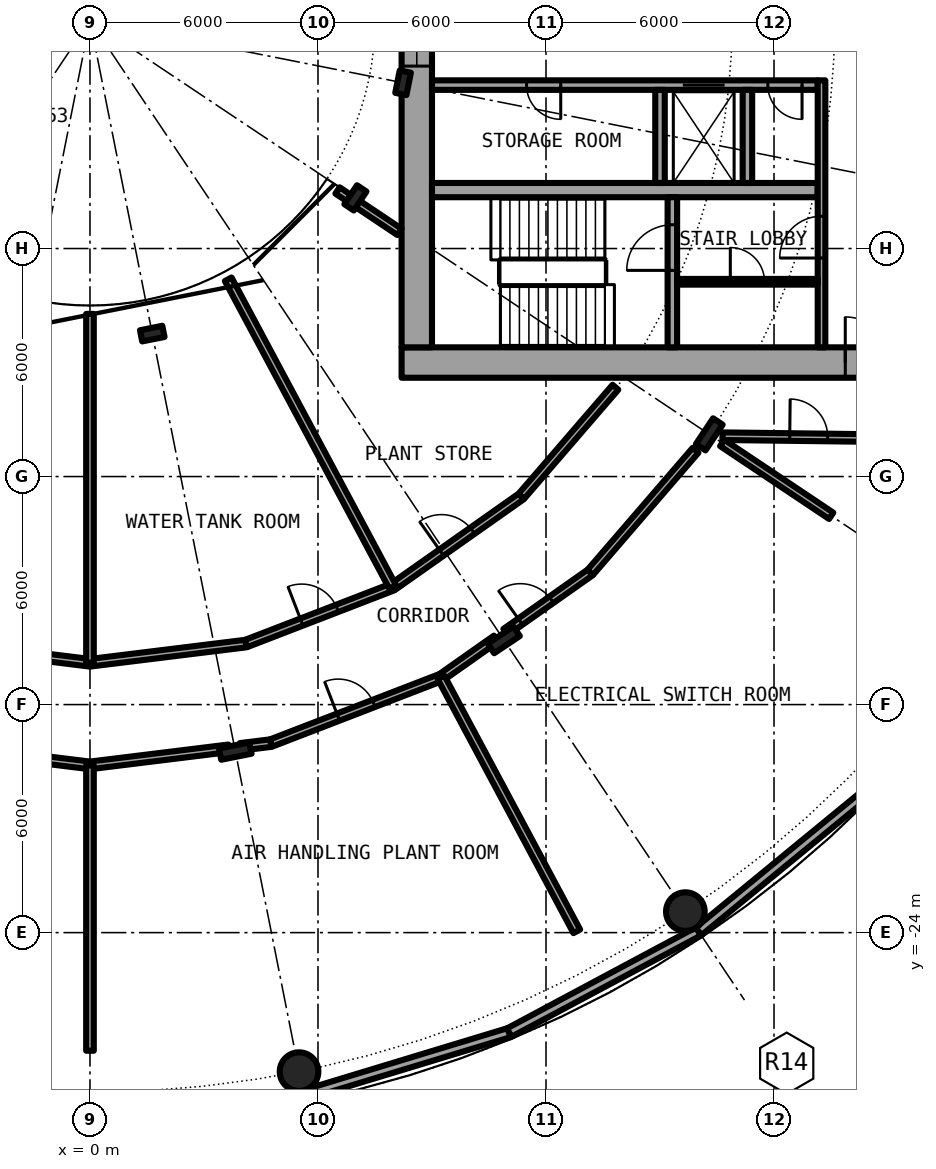
"""IFC4 building model, lengths in metres.
Left out: names, types, materials, properties, quantities, classifications, styles, units other than length and angle.
Written with IfcOpenShell. Run it as: python <this file> out.ifc"""

import sys

from ifc_helpers import new_model, si_unit, direction, frame, frame_2d, origin, origin_2d, place, context, subcontext, project, spatial, rectangle, hollow_circle, i_section, extrude, element, fill, save


model = new_model("IFC4")
c1 = context("Model", 3, precision=1e-05, world=origin(), true_north=direction((0.0, 1.0)))
c2 = subcontext(c1, "Body", "Model", "MODEL_VIEW")
j1 = project(units=[si_unit("LENGTHUNIT", "METRE"), si_unit("PLANEANGLEUNIT", "RADIAN")], contexts=[c1])
p1 = place(None, origin())
s1 = spatial("IfcSite", under=j1, at=p1, CompositionType="ELEMENT")
p2 = place(p1, origin())
s2 = spatial("IfcBuilding", under=s1, at=p2, CompositionType="ELEMENT")
p3 = place(p2, frame((0.0, 0.0, 18.3)))
s3 = spatial("IfcBuildingStorey", under=s2, at=p3, CompositionType="ELEMENT", Elevation=18.3)
for number, where, z_axis, x_axis in (
    (1, (5.501, -27.658, 0.0), (0.0, 0.0, 1.0), (1.0, 0.0, 0.0)),
    (2, (15.667, -23.448, 0.0), (0.0, 0.0, 1.0), (1.0, 0.0, 0.0)),
):
    element("IfcColumn", number, at=place(p3, frame(where, z_axis=z_axis, x_axis=x_axis)), inside=s3, PredefinedType="COLUMN", context=c2, shape_type="SweptSolid", body=[
        extrude(hollow_circle(Radius=0.508, WallThickness=0.05, at=origin_2d()), origin(), (0.0, 0.0, 1.0), 4.5),
    ])
for number, where, z_axis, x_axis in (
    (3, (3.824, -19.223, 0.0), (0.0, 0.0, 1.0), (0.195, -0.981, 0.0)),
    (4, (10.889, -16.297, 0.0), (0.0, 0.0, 1.0), (0.556, -0.831, 0.0)),
    (5, (16.297, -10.889, 0.0), (0.0, 0.0, 1.0), (0.831, -0.556, 0.0)),
):
    element("IfcColumn", number, at=place(p3, frame(where, z_axis=z_axis, x_axis=x_axis)), inside=s3, PredefinedType="COLUMN", context=c2, shape_type="SweptSolid", body=[
        extrude(i_section(OverallWidth=0.303, OverallDepth=0.814, WebThickness=0.021, FlangeThickness=0.04, FilletRadius=0.03, at=origin_2d()), origin(), (0.0, 0.0, 1.0), 4.5),
    ])
for number, where, z_axis, x_axis in (
    (6, (1.639, -8.239, 0.0), (0.0, 0.0, 1.0), (0.195, -0.981, 0.0)),
    (7, (6.984, -4.667, 0.0), (0.0, 0.0, 1.0), (0.831, -0.556, 0.0)),
    (8, (8.239, -1.639, 0.0), (0.0, 0.0, 1.0), (0.981, -0.195, 0.0)),
):
    element("IfcColumn", number, at=place(p3, frame(where, z_axis=z_axis, x_axis=x_axis)), inside=s3, PredefinedType="COLUMN", context=c2, shape_type="SweptSolid", body=[
        extrude(i_section(OverallWidth=0.3, OverallDepth=0.6, WebThickness=0.015, FlangeThickness=0.03, FilletRadius=0.027, at=origin_2d()), origin(), (0.0, 0.0, 1.0), 4.5),
    ])
p4 = place(p3, frame((5.623, -28.271, 0.0), z_axis=(0.0, 0.0, 1.0), x_axis=(0.956969521741, 0.29018844646, 0.0)))
e9 = element("IfcWall", 9, at=p4, inside=s3, PredefinedType="SOLIDWALL", context=c2, shape_type="SweptSolid", body=[
    extrude(rectangle(XDim=5.651, YDim=0.25, at=frame_2d((2.826, 0.0))), origin(), (0.0, 0.0, 1.0), 4.15),
])
p5 = place(p3, frame((11.031, -26.631, 0.0), z_axis=(0.0, 0.0, 1.0), x_axis=(0.881874058161, 0.471485042756, 0.0)))
e10 = element("IfcWall", 10, at=p5, inside=s3, PredefinedType="SOLIDWALL", context=c2, shape_type="SweptSolid", body=[
    extrude(rectangle(XDim=5.65, YDim=0.25, at=frame_2d((2.825, 0.0))), origin(), (0.0, 0.0, 1.0), 4.15),
])
p6 = place(p3, frame((16.014, -23.967, 0.0), z_axis=(0.0, 0.0, 1.0), x_axis=(0.773001659186, 0.634403999748, 0.0)))
e11 = element("IfcWall", 11, at=p6, inside=s3, PredefinedType="SOLIDWALL", context=c2, shape_type="SweptSolid", body=[
    extrude(rectangle(XDim=5.651, YDim=0.25, at=frame_2d((2.825, 0.0))), origin(), (0.0, 0.0, 1.0), 4.15),
])
p7 = place(p3, frame((8.2, -9.0, 0.0), z_axis=(0.0, 0.0, 1.0), x_axis=(1.0, 0.0, 0.0)))
e12 = element("IfcWall", 12, at=p7, inside=s3, PredefinedType="SHEAR", context=c2, shape_type="SweptSolid", body=[
    extrude(rectangle(XDim=14.2, YDim=0.8, at=frame_2d((7.1, 0.0))), origin(), (0.0, 0.0, 1.0), 4.5),
])
p8 = place(p7, frame((11.675, 0.0, 0.0)))
e13 = element("IfcOpeningElement", 13, at=p8, cuts=e12, PredefinedType="OPENING", context=c2, shape_type="SweptSolid", body=[
    extrude(rectangle(XDim=1.2, YDim=2.3, at=frame_2d((0.6, 1.15))), frame((0.0, 0.41, 0.0), z_axis=(0.0, -1.0, 0.0), x_axis=(1.0, 0.0, 0.0)), (0.0, 0.0, 1.0), 0.82),
])
p9 = place(p3, frame((8.6, -8.6, 0.0), z_axis=(0.0, 0.0, 1.0), x_axis=(0.0, 1.0, 0.0)))
e14 = element("IfcWall", 14, at=p9, inside=s3, PredefinedType="SHEAR", context=c2, shape_type="SweptSolid", body=[
    extrude(rectangle(XDim=17.2, YDim=0.8, at=frame_2d((8.6, 0.0))), origin(), (0.0, 0.0, 1.0), 4.5),
])
p10 = place(p9, frame((7.4, 0.0, 0.1)))
e15 = element("IfcOpeningElement", 15, at=p10, cuts=e14, PredefinedType="OPENING", context=c2, shape_type="SweptSolid", body=[
    extrude(rectangle(XDim=2.4, YDim=2.2, at=frame_2d((1.2, 1.1))), frame((0.0, 0.41, 0.0), z_axis=(0.0, -1.0, 0.0), x_axis=(1.0, 0.0, 0.0)), (0.0, 0.0, 1.0), 0.82),
])
p11 = place(p3, frame((19.15, -1.7, 0.0), z_axis=(0.0, 0.0, 1.0), x_axis=(-1.0, 0.0, 0.0)))
e16 = element("IfcWall", 16, at=p11, inside=s3, PredefinedType="SHEAR", context=c2, shape_type="SweptSolid", body=[
    extrude(rectangle(XDim=10.15, YDim=0.25, at=frame_2d((5.075, 0.0))), origin(), (0.0, 0.0, 1.0), 4.5),
])
p12 = place(p11, frame((2.45, 0.0, 0.0)))
e17 = element("IfcOpeningElement", 17, at=p12, cuts=e16, PredefinedType="OPENING", context=c2, shape_type="SweptSolid", body=[
    extrude(rectangle(XDim=1.1, YDim=2.3, at=frame_2d((0.55, 1.15))), frame((0.0, 0.135, 0.0), z_axis=(0.0, -1.0, 0.0), x_axis=(1.0, 0.0, 0.0)), (0.0, 0.0, 1.0), 0.27),
])
p13 = place(p11, frame((6.762, 0.0, 0.0)))
e18 = element("IfcOpeningElement", 18, at=p13, cuts=e16, PredefinedType="OPENING", context=c2, shape_type="SweptSolid", body=[
    extrude(rectangle(XDim=0.9, YDim=2.3, at=frame_2d((0.45, 1.15))), frame((0.0, 0.135, 0.0), z_axis=(0.0, -1.0, 0.0), x_axis=(1.0, 0.0, 0.0)), (0.0, 0.0, 1.0), 0.27),
])
p14 = place(p11, frame((0.413, 0.0, 0.0)))
e19 = element("IfcOpeningElement", 19, at=p14, cuts=e16, PredefinedType="OPENING", context=c2, shape_type="SweptSolid", body=[
    extrude(rectangle(XDim=0.9, YDim=2.3, at=frame_2d((0.45, 1.15))), frame((0.0, 0.135, 0.0), z_axis=(0.0, -1.0, 0.0), x_axis=(1.0, 0.0, 0.0)), (0.0, 0.0, 1.0), 0.27),
])
p15 = place(p3, frame((9.0, -4.462, 0.0), z_axis=(0.0, 0.0, 1.0), x_axis=(1.0, 0.0, 0.0)))
e20 = element("IfcWall", 20, at=p15, inside=s3, PredefinedType="SHEAR", context=c2, shape_type="SweptSolid", body=[
    extrude(rectangle(XDim=10.15, YDim=0.375, at=frame_2d((5.075, 0.0))), origin(), (0.0, 0.0, 1.0), 4.5),
])
p16 = place(p3, frame((15.325, -8.6, 0.0), z_axis=(0.0, 0.0, 1.0), x_axis=(0.0, 1.0, 0.0)))
e21 = element("IfcWall", 21, at=p16, inside=s3, PredefinedType="SHEAR", context=c2, shape_type="SweptSolid", body=[
    extrude(rectangle(XDim=3.95, YDim=0.25, at=frame_2d((1.975, 0.0))), origin(), (0.0, 0.0, 1.0), 4.5),
])
p17 = place(p16, frame((2.025, 0.0, 0.0)))
e22 = element("IfcOpeningElement", 22, at=p17, cuts=e21, PredefinedType="OPENING", context=c2, shape_type="SweptSolid", body=[
    extrude(rectangle(XDim=1.2, YDim=2.3, at=frame_2d((0.6, 1.15))), frame((0.0, 0.135, 0.0), z_axis=(0.0, -1.0, 0.0), x_axis=(1.0, 0.0, 0.0)), (0.0, 0.0, 1.0), 0.27),
])
for number, where, z_axis, x_axis in (
    (23, (15.0, -1.825, 0.0), (0.0, 0.0, 1.0), (0.0, -1.0, 0.0)),
    (24, (17.3, -1.825, 0.0), (0.0, 0.0, 1.0), (0.0, -1.0, 0.0)),
):
    element("IfcWall", number, at=place(p3, frame(where, z_axis=z_axis, x_axis=x_axis)), inside=s3, PredefinedType="SOLIDWALL", context=c2, shape_type="SweptSolid", body=[
        extrude(rectangle(XDim=2.45, YDim=0.25, at=frame_2d((1.225, 0.0))), origin(), (0.0, 0.0, 1.0), 4.15),
    ])
p18 = place(p3, frame((19.25, -8.6, 0.0), z_axis=(0.0, 0.0, 1.0), x_axis=(0.0, 1.0, 0.0)))
e25 = element("IfcWall", 25, at=p18, inside=s3, PredefinedType="SOLIDWALL", context=c2, shape_type="SweptSolid", body=[
    extrude(rectangle(XDim=7.025, YDim=0.2, at=frame_2d((3.513, 0.0))), origin(), (0.0, 0.0, 1.0), 4.15),
])
p19 = place(p18, frame((2.35, 0.0, 0.0)))
e26 = element("IfcOpeningElement", 26, at=p19, cuts=e25, PredefinedType="OPENING", context=c2, shape_type="SweptSolid", body=[
    extrude(rectangle(XDim=1.1, YDim=2.3, at=frame_2d((0.55, 1.15))), frame((0.0, 0.11, 0.0), z_axis=(0.0, -1.0, 0.0), x_axis=(1.0, 0.0, 0.0)), (0.0, 0.0, 1.0), 0.22),
])
p20 = place(p3, frame((15.45, -6.875, 0.0), z_axis=(0.0, 0.0, 1.0), x_axis=(1.0, 0.0, 0.0)))
e27 = element("IfcWall", 27, at=p20, inside=s3, PredefinedType="PARTITIONING", context=c2, shape_type="SweptSolid", body=[
    extrude(rectangle(XDim=3.7, YDim=0.15, at=frame_2d((1.85, 0.0))), origin(), (0.0, 0.0, 1.0), 4.15),
])
p21 = place(p20, frame((1.4, 0.0, 0.0)))
e28 = element("IfcOpeningElement", 28, at=p21, cuts=e27, PredefinedType="OPENING", context=c2, shape_type="SweptSolid", body=[
    extrude(rectangle(XDim=0.9, YDim=2.3, at=frame_2d((0.45, 1.15))), frame((0.0, 0.085, 0.0), z_axis=(0.0, -1.0, 0.0), x_axis=(1.0, 0.0, 0.0)), (0.0, 0.0, 1.0), 0.17),
])
for number, where, z_axis, x_axis in (
    (29, (-3.655, -19.15, 0.0), (0.0, 0.0, 1.0), (0.992, -0.122, 0.0)),
    (30, (0.0, -19.6, 0.0), (0.0, 0.0, 1.0), (0.992, 0.122, 0.0)),
):
    element("IfcWall", number, at=place(p3, frame(where, z_axis=z_axis, x_axis=x_axis)), inside=s3, PredefinedType="PARTITIONING", context=c2, shape_type="SweptSolid", body=[
        extrude(rectangle(XDim=3.683, YDim=0.2, at=frame_2d((1.841, 0.0))), origin(), (0.0, 0.0, 1.0), 3.73),
    ])
p22 = place(p3, frame((3.956, -19.112, 0.0), z_axis=(0.0, 0.0, 1.0), x_axis=(0.992521102393, 0.122073180119, 0.0)))
e31 = element("IfcWall", 31, at=p22, inside=s3, PredefinedType="PARTITIONING", context=c2, shape_type="SweptSolid", body=[
    extrude(rectangle(XDim=0.812, YDim=0.2, at=frame_2d((0.406, 0.0))), origin(), (0.0, 0.0, 1.0), 3.73),
])
p23 = place(p3, frame((4.762, -19.013, 0.0), z_axis=(0.0, 0.0, 1.0), x_axis=(0.932988479706, 0.359906233255, 0.0)))
e32 = element("IfcWall", 32, at=p23, inside=s3, PredefinedType="PARTITIONING", context=c2, shape_type="SweptSolid", body=[
    extrude(rectangle(XDim=4.799, YDim=0.2, at=frame_2d((2.399, 0.0))), origin(), (0.0, 0.0, 1.0), 3.73),
])
p24 = place(p23, frame((1.899, 0.0, 0.0)))
e33 = element("IfcOpeningElement", 33, at=p24, cuts=e32, PredefinedType="OPENING", context=c2, shape_type="SweptSolid", body=[
    extrude(rectangle(XDim=1.0, YDim=2.3, at=frame_2d((0.5, 1.15))), frame((0.0, 0.11, 0.0), z_axis=(0.0, -1.0, 0.0), x_axis=(1.0, 0.0, 0.0)), (0.0, 0.0, 1.0), 0.22),
])
p25 = place(p3, frame((9.239, -17.286, 0.0), z_axis=(0.0, 0.0, 1.0), x_axis=(0.817849682833, 0.575431921508, 0.0)))
e34 = element("IfcWall", 34, at=p25, inside=s3, PredefinedType="PARTITIONING", context=c2, shape_type="SweptSolid", body=[
    extrude(rectangle(XDim=1.771, YDim=0.2, at=frame_2d((0.885, 0.0))), origin(), (0.0, 0.0, 1.0), 3.73),
])
p26 = place(p3, frame((10.935, -16.092, 0.0), z_axis=(0.0, 0.0, 1.0), x_axis=(0.817595540973, 0.575792958781, 0.0)))
e35 = element("IfcWall", 35, at=p26, inside=s3, PredefinedType="PARTITIONING", context=c2, shape_type="SweptSolid", body=[
    extrude(rectangle(XDim=2.725, YDim=0.2, at=frame_2d((1.363, 0.0))), origin(), (0.0, 0.0, 1.0), 3.73),
])
p27 = place(p26, frame((0.476, 0.0, 0.0)))
e36 = element("IfcOpeningElement", 36, at=p27, cuts=e35, PredefinedType="OPENING", context=c2, shape_type="SweptSolid", body=[
    extrude(rectangle(XDim=1.0, YDim=2.3, at=frame_2d((0.5, 1.15))), frame((0.0, 0.11, 0.0), z_axis=(0.0, -1.0, 0.0), x_axis=(1.0, 0.0, 0.0)), (0.0, 0.0, 1.0), 0.22),
])
p28 = place(p3, frame((13.163, -14.523, 0.0), z_axis=(0.0, 0.0, 1.0), x_axis=(0.653128497371, 0.757247097005, 0.0)))
e37 = element("IfcWall", 37, at=p28, inside=s3, PredefinedType="PARTITIONING", context=c2, shape_type="SweptSolid", body=[
    extrude(rectangle(XDim=4.244, YDim=0.2, at=frame_2d((2.122, 0.0))), origin(), (0.0, 0.0, 1.0), 3.73),
])
for number, where, z_axis, x_axis in (
    (38, (-4.106, -16.394, 0.0), (0.0, 0.0, 1.0), (0.992, -0.122, 0.0)),
    (39, (0.0, -16.9, 0.0), (0.0, 0.0, 1.0), (0.992, 0.122, 0.0)),
):
    element("IfcWall", number, at=place(p3, frame(where, z_axis=z_axis, x_axis=x_axis)), inside=s3, PredefinedType="PARTITIONING", context=c2, shape_type="SweptSolid", body=[
        extrude(rectangle(XDim=4.137, YDim=0.2, at=frame_2d((2.068, 0.0))), origin(), (0.0, 0.0, 1.0), 4.15),
    ])
p29 = place(p3, frame((4.106, -16.394, 0.0), z_axis=(0.0, 0.0, 1.0), x_axis=(0.932943640288, 0.360022449363, 0.0)))
e40 = element("IfcWall", 40, at=p29, inside=s3, PredefinedType="PARTITIONING", context=c2, shape_type="SweptSolid", body=[
    extrude(rectangle(XDim=4.139, YDim=0.2, at=frame_2d((2.069, 0.0))), origin(), (0.0, 0.0, 1.0), 4.15),
])
p30 = place(p29, frame((1.569, 0.0, 0.0)))
e41 = element("IfcOpeningElement", 41, at=p30, cuts=e40, PredefinedType="OPENING", context=c2, shape_type="SweptSolid", body=[
    extrude(rectangle(XDim=1.0, YDim=2.3, at=frame_2d((0.5, 1.15))), frame((0.0, 0.11, 0.0), z_axis=(0.0, -1.0, 0.0), x_axis=(1.0, 0.0, 0.0)), (0.0, 0.0, 1.0), 0.22),
])
p31 = place(p3, frame((7.967, -14.904, 0.0), z_axis=(0.0, 0.0, 1.0), x_axis=(0.817567680547, 0.575832517079, 0.0)))
e42 = element("IfcWall", 42, at=p31, inside=s3, PredefinedType="PARTITIONING", context=c2, shape_type="SweptSolid", body=[
    extrude(rectangle(XDim=4.137, YDim=0.2, at=frame_2d((2.068, 0.0))), origin(), (0.0, 0.0, 1.0), 4.15),
])
p32 = place(p31, frame((1.568, 0.0, 0.0)))
e43 = element("IfcOpeningElement", 43, at=p32, cuts=e42, PredefinedType="OPENING", context=c2, shape_type="SweptSolid", body=[
    extrude(rectangle(XDim=1.0, YDim=2.3, at=frame_2d((0.5, 1.15))), frame((0.0, 0.11, 0.0), z_axis=(0.0, -1.0, 0.0), x_axis=(1.0, 0.0, 0.0)), (0.0, 0.0, 1.0), 0.22),
])
p33 = place(p3, frame((11.349, -12.522, 0.0), z_axis=(0.0, 0.0, 1.0), x_axis=(0.653220956969, 0.757167340406, 0.0)))
e44 = element("IfcWall", 44, at=p33, inside=s3, PredefinedType="PARTITIONING", context=c2, shape_type="SweptSolid", body=[
    extrude(rectangle(XDim=3.793, YDim=0.2, at=frame_2d((1.896, 0.0))), origin(), (0.0, 0.0, 1.0), 4.15),
])
p34 = place(p3, frame((16.643, -10.938, 0.0), z_axis=(0.0, 0.0, 1.0), x_axis=(0.999924074118, -0.012322580895, 0.0)))
e45 = element("IfcWall", 45, at=p34, inside=s3, PredefinedType="PARTITIONING", context=c2, shape_type="SweptSolid", body=[
    extrude(rectangle(XDim=5.032, YDim=0.2, at=frame_2d((2.516, 0.0))), origin(), (0.0, 0.0, 1.0), 4.15),
])
p35 = place(p34, frame((1.77, 0.0, 0.0)))
e46 = element("IfcOpeningElement", 46, at=p35, cuts=e45, PredefinedType="OPENING", context=c2, shape_type="SweptSolid", body=[
    extrude(rectangle(XDim=1.0, YDim=2.3, at=frame_2d((0.5, 1.15))), frame((0.0, 0.11, 0.0), z_axis=(0.0, -1.0, 0.0), x_axis=(1.0, 0.0, 0.0)), (0.0, 0.0, 1.0), 0.22),
])
p36 = place(p3, frame((6.513, -4.472, 0.0), z_axis=(0.0, 0.0, 1.0), x_axis=(0.831417956244, -0.555647533996, 0.0)))
e47 = element("IfcWall", 47, at=p36, inside=s3, PredefinedType="PARTITIONING", context=c2, shape_type="SweptSolid", body=[
    extrude(rectangle(XDim=1.962, YDim=0.2, at=frame_2d((0.981, 0.0))), origin(), (0.0, 0.0, 1.0), 4.15),
])
p37 = place(p3, frame((0.0, -27.108, 0.0), z_axis=(0.0, 0.0, 1.0), x_axis=(0.0, 1.0, 0.0)))
e48 = element("IfcWall", 48, at=p37, inside=s3, PredefinedType="PARTITIONING", context=c2, shape_type="SweptSolid", body=[
    extrude(rectangle(XDim=7.508, YDim=0.2, at=frame_2d((3.754, 0.0))), origin(), (0.0, 0.0, 1.0), 4.15),
])
p38 = place(p3, frame((0.0, -16.9, 0.0), z_axis=(0.0, 0.0, 1.0), x_axis=(0.0, 1.0, 0.0)))
e49 = element("IfcWall", 49, at=p38, inside=s3, PredefinedType="PARTITIONING", context=c2, shape_type="SweptSolid", body=[
    extrude(rectangle(XDim=9.18, YDim=0.2, at=frame_2d((4.59, 0.0))), origin(), (0.0, 0.0, 1.0), 4.15),
])
p39 = place(p3, frame((3.638, -6.809, 0.0), z_axis=(0.0, 0.0, 1.0), x_axis=(0.471460365694, -0.881887251059, 0.0)))
e50 = element("IfcWall", 50, at=p39, inside=s3, PredefinedType="PARTITIONING", context=c2, shape_type="SweptSolid", body=[
    extrude(rectangle(XDim=9.18, YDim=0.2, at=frame_2d((4.59, 0.0))), origin(), (0.0, 0.0, 1.0), 4.15),
])
p40 = place(p3, frame((9.239, -17.286, 0.0), z_axis=(0.0, 0.0, 1.0), x_axis=(0.471439510802, -0.881898399848, 0.0)))
e51 = element("IfcWall", 51, at=p40, inside=s3, PredefinedType="PARTITIONING", context=c2, shape_type="SweptSolid", body=[
    extrude(rectangle(XDim=7.575, YDim=0.2, at=frame_2d((3.787, 0.0))), origin(), (0.0, 0.0, 1.0), 4.15),
])
p41 = place(p3, frame((16.636, -11.115, 0.0), z_axis=(0.0, 0.0, 1.0), x_axis=(0.831331256958, -0.555777240632, 0.0)))
e52 = element("IfcWall", 52, at=p41, inside=s3, PredefinedType="PARTITIONING", context=c2, shape_type="SweptSolid", body=[
    extrude(rectangle(XDim=3.451, YDim=0.2, at=frame_2d((1.726, 0.0))), origin(), (0.0, 0.0, 1.0), 3.23),
])
p42 = place(p12, origin())
e53 = element("IfcDoor", 53, at=p42, inside=s3, OperationType="DOUBLE_DOOR_SLIDING", PredefinedType="DOOR", context=c2, shape_type="SweptSolid", body=[
    extrude(rectangle(XDim=1.1, YDim=2.3, at=frame_2d((0.55, 1.15))), frame((0.0, 0.025, 0.0), z_axis=(0.0, -1.0, 0.0), x_axis=(1.0, 0.0, 0.0)), (0.0, 0.0, 1.0), 0.05),
])
fill(e17, e53)
p43 = place(p13, origin())
e54 = element("IfcDoor", 54, at=p43, inside=s3, OperationType="SINGLE_SWING_LEFT", PredefinedType="DOOR", context=c2, shape_type="SweptSolid", body=[
    extrude(rectangle(XDim=0.9, YDim=2.3, at=frame_2d((0.45, 1.15))), frame((0.0, 0.025, 0.0), z_axis=(0.0, -1.0, 0.0), x_axis=(1.0, 0.0, 0.0)), (0.0, 0.0, 1.0), 0.05),
])
fill(e18, e54)
p44 = place(p14, origin())
e55 = element("IfcDoor", 55, at=p44, inside=s3, OperationType="SINGLE_SWING_RIGHT", PredefinedType="DOOR", context=c2, shape_type="SweptSolid", body=[
    extrude(rectangle(XDim=0.9, YDim=2.3, at=frame_2d((0.45, 1.15))), frame((0.0, 0.025, 0.0), z_axis=(0.0, -1.0, 0.0), x_axis=(1.0, 0.0, 0.0)), (0.0, 0.0, 1.0), 0.05),
])
fill(e19, e55)
p45 = place(p21, origin())
e56 = element("IfcDoor", 56, at=p45, inside=s3, OperationType="SINGLE_SWING_LEFT", PredefinedType="DOOR", context=c2, shape_type="SweptSolid", body=[
    extrude(rectangle(XDim=0.9, YDim=2.3, at=frame_2d((0.45, 1.15))), frame((0.0, 0.025, 0.0), z_axis=(0.0, -1.0, 0.0), x_axis=(1.0, 0.0, 0.0)), (0.0, 0.0, 1.0), 0.05),
])
fill(e28, e56)
p46 = place(p17, origin())
e57 = element("IfcDoor", 57, at=p46, inside=s3, OperationType="SINGLE_SWING_LEFT", PredefinedType="DOOR", context=c2, shape_type="SweptSolid", body=[
    extrude(rectangle(XDim=1.2, YDim=2.3, at=frame_2d((0.6, 1.15))), frame((0.0, 0.025, 0.0), z_axis=(0.0, -1.0, 0.0), x_axis=(1.0, 0.0, 0.0)), (0.0, 0.0, 1.0), 0.05),
])
fill(e22, e57)
p47 = place(p19, origin())
e58 = element("IfcDoor", 58, at=p47, inside=s3, OperationType="SINGLE_SWING_RIGHT", PredefinedType="DOOR", context=c2, shape_type="SweptSolid", body=[
    extrude(rectangle(XDim=1.1, YDim=2.3, at=frame_2d((0.55, 1.15))), frame((0.0, 0.025, 0.0), z_axis=(0.0, -1.0, 0.0), x_axis=(1.0, 0.0, 0.0)), (0.0, 0.0, 1.0), 0.05),
])
fill(e26, e58)
p48 = place(p8, origin())
e59 = element("IfcDoor", 59, at=p48, inside=s3, OperationType="SINGLE_SWING_LEFT", PredefinedType="DOOR", context=c2, shape_type="SweptSolid", body=[
    extrude(rectangle(XDim=1.2, YDim=2.3, at=frame_2d((0.6, 1.15))), frame((0.0, 0.025, 0.0), z_axis=(0.0, -1.0, 0.0), x_axis=(1.0, 0.0, 0.0)), (0.0, 0.0, 1.0), 0.05),
])
fill(e13, e59)
p49 = place(p10, origin())
e60 = element("IfcWindow", 60, at=p49, inside=s3, PartitioningType="SINGLE_PANEL", PredefinedType="WINDOW", context=c2, shape_type="SweptSolid", body=[
    extrude(rectangle(XDim=2.4, YDim=2.2, at=frame_2d((1.2, 1.1))), frame((0.0, 0.03, 0.0), z_axis=(0.0, -1.0, 0.0), x_axis=(1.0, 0.0, 0.0)), (0.0, 0.0, 1.0), 0.06),
])
fill(e15, e60)
p50 = place(p24, origin())
e61 = element("IfcDoor", 61, at=p50, inside=s3, OperationType="SINGLE_SWING_LEFT", PredefinedType="DOOR", context=c2, shape_type="SweptSolid", body=[
    extrude(rectangle(XDim=1.0, YDim=2.3, at=frame_2d((0.5, 1.15))), frame((0.0, 0.025, 0.0), z_axis=(0.0, -1.0, 0.0), x_axis=(1.0, 0.0, 0.0)), (0.0, 0.0, 1.0), 0.05),
])
fill(e33, e61)
p51 = place(p27, origin())
e62 = element("IfcDoor", 62, at=p51, inside=s3, OperationType="SINGLE_SWING_LEFT", PredefinedType="DOOR", context=c2, shape_type="SweptSolid", body=[
    extrude(rectangle(XDim=1.0, YDim=2.3, at=frame_2d((0.5, 1.15))), frame((0.0, 0.025, 0.0), z_axis=(0.0, -1.0, 0.0), x_axis=(1.0, 0.0, 0.0)), (0.0, 0.0, 1.0), 0.05),
])
fill(e36, e62)
p52 = place(p30, origin())
e63 = element("IfcDoor", 63, at=p52, inside=s3, OperationType="SINGLE_SWING_RIGHT", PredefinedType="DOOR", context=c2, shape_type="SweptSolid", body=[
    extrude(rectangle(XDim=1.0, YDim=2.3, at=frame_2d((0.5, 1.15))), frame((0.0, 0.025, 0.0), z_axis=(0.0, -1.0, 0.0), x_axis=(1.0, 0.0, 0.0)), (0.0, 0.0, 1.0), 0.05),
])
fill(e41, e63)
p53 = place(p32, origin())
e64 = element("IfcDoor", 64, at=p53, inside=s3, OperationType="SINGLE_SWING_RIGHT", PredefinedType="DOOR", context=c2, shape_type="SweptSolid", body=[
    extrude(rectangle(XDim=1.0, YDim=2.3, at=frame_2d((0.5, 1.15))), frame((0.0, 0.025, 0.0), z_axis=(0.0, -1.0, 0.0), x_axis=(1.0, 0.0, 0.0)), (0.0, 0.0, 1.0), 0.05),
])
fill(e43, e64)
p54 = place(p35, origin())
e65 = element("IfcDoor", 65, at=p54, inside=s3, OperationType="SINGLE_SWING_LEFT", PredefinedType="DOOR", context=c2, shape_type="SweptSolid", body=[
    extrude(rectangle(XDim=1.0, YDim=2.3, at=frame_2d((0.5, 1.15))), frame((0.0, 0.025, 0.0), z_axis=(0.0, -1.0, 0.0), x_axis=(1.0, 0.0, 0.0)), (0.0, 0.0, 1.0), 0.05),
])
fill(e46, e65)
save(model, sys.argv[1])
